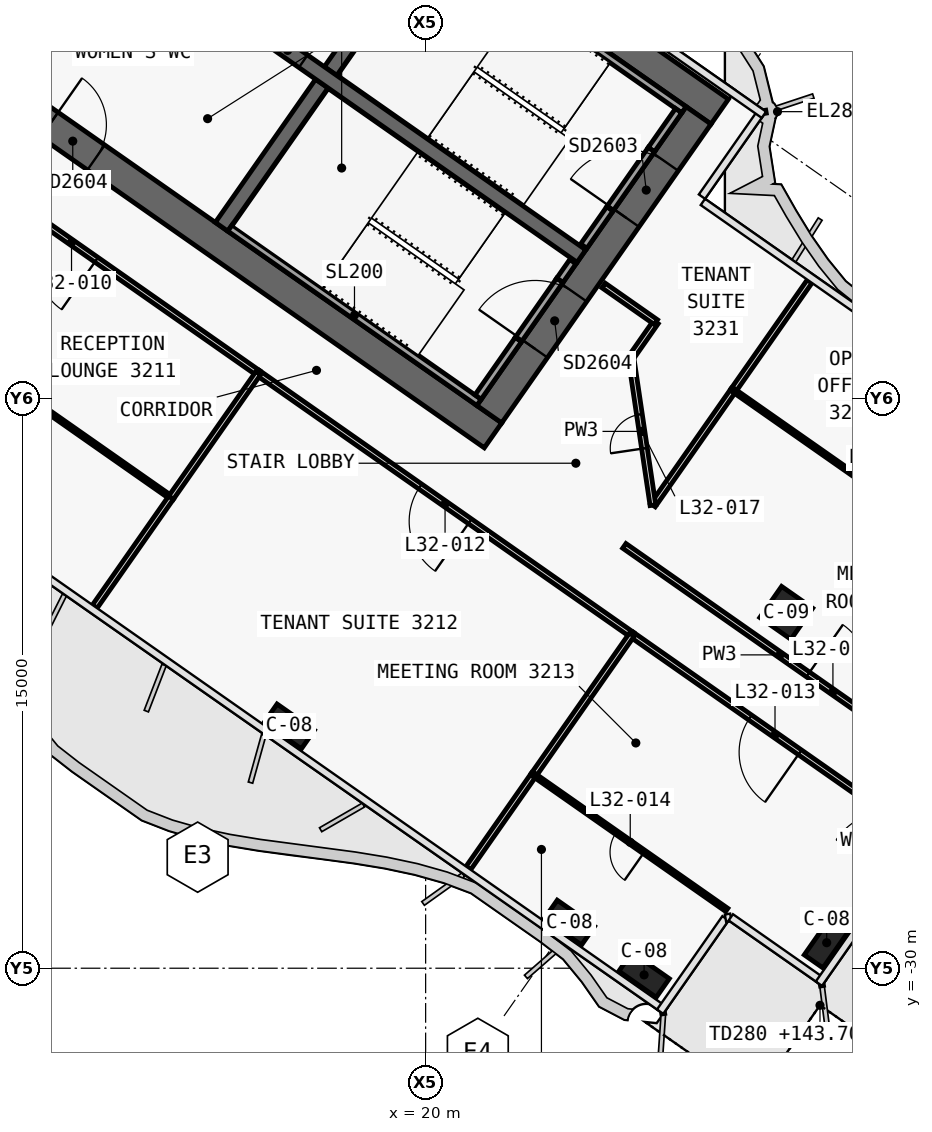
"""IFC4 building model, lengths in metres.
Left out: names, types, materials, properties, quantities, classifications, styles, units other than length and angle.
Written with IfcOpenShell. Run it as: python <this file> out.ifc"""

import sys

from ifc_helpers import new_model, si_unit, direction, frame, frame_2d, origin, origin_2d, place, context, subcontext, project, spatial, polyline, rectangle, outline, extrude, element, fill, save


model = new_model("IFC4")
c1 = context("Model", 3, precision=1e-05, world=origin(), true_north=direction((0.0, 1.0)))
c2 = subcontext(c1, "Body", "Model", "MODEL_VIEW")
j1 = project(units=[si_unit("LENGTHUNIT", "METRE"), si_unit("PLANEANGLEUNIT", "RADIAN")], contexts=[c1])
p1 = place(None, origin())
s1 = spatial("IfcSite", under=j1, at=p1, CompositionType="ELEMENT")
p2 = place(p1, origin())
s2 = spatial("IfcBuilding", under=s1, at=p2, CompositionType="ELEMENT")
p3 = place(p2, frame((0.0, 0.0, 143.7)))
s3 = spatial("IfcBuildingStorey", under=s2, at=p3, CompositionType="ELEMENT", Elevation=143.7)
p4 = place(p3, frame((-0.029, 11.984, 0.0), z_axis=(0.0, 0.0, 1.0), x_axis=(0.819151382952, -0.573577380837, 0.0)))
e1 = element("IfcWall", 1, at=p4, inside=s3, PredefinedType="SHEAR", context=c2, shape_type="SweptSolid", body=[
    extrude(outline(polyline([(33.898, 0.4), (-0.0, 0.4), (0.56, -0.4), (33.898, -0.4), (33.898, 0.4)])), origin(), (0.0, 0.0, 1.0), 3.9),
])
p5 = place(p3, frame((-0.029, -0.712, 0.0), z_axis=(0.0, 0.0, 1.0), x_axis=(0.819151758019, -0.573576845187, 0.0)))
e2 = element("IfcWall", 2, at=p5, inside=s3, PredefinedType="SHEAR", context=c2, shape_type="SweptSolid", body=[
    extrude(outline(polyline([(26.616, 0.4), (-0.0, 0.4), (0.56, -0.4), (26.616, -0.4), (26.616, 0.4)])), origin(), (0.0, 0.0, 1.0), 3.9),
])
p6 = place(p5, frame((6.666, 0.0, 0.0)))
e3 = element("IfcOpeningElement", 3, at=p6, cuts=e2, PredefinedType="OPENING", context=c2, shape_type="SweptSolid", body=[
    extrude(rectangle(XDim=1.5, YDim=2.1, at=frame_2d((0.75, 1.05))), frame((0.0, 0.41, 0.0), z_axis=(0.0, -1.0, 0.0), x_axis=(1.0, 0.0, 0.0)), (0.0, 0.0, 1.0), 0.82),
])
p7 = place(p5, frame((12.366, 0.0, 0.0)))
e4 = element("IfcOpeningElement", 4, at=p7, cuts=e2, PredefinedType="OPENING", context=c2, shape_type="SweptSolid", body=[
    extrude(rectangle(XDim=1.5, YDim=2.1, at=frame_2d((0.75, 1.05))), frame((0.0, 0.41, 0.0), z_axis=(0.0, -1.0, 0.0), x_axis=(1.0, 0.0, 0.0)), (0.0, 0.0, 1.0), 0.82),
])
p8 = place(p3, frame((21.675, -15.421, 0.0), z_axis=(0.0, 0.0, 1.0), x_axis=(0.573581815061, 0.819148278049, 0.0)))
e5 = element("IfcWall", 5, at=p8, inside=s3, PredefinedType="SHEAR", context=c2, shape_type="SweptSolid", body=[
    extrude(outline(polyline([(9.6, 0.4), (0.0, 0.4), (0.0, -0.4), (9.6, -0.4), (9.6, 0.4)])), origin(), (0.0, 0.0, 1.0), 3.9),
])
p9 = place(p8, frame((6.3, 0.0, 0.0)))
e6 = element("IfcOpeningElement", 6, at=p9, cuts=e5, PredefinedType="OPENING", context=c2, shape_type="SweptSolid", body=[
    extrude(rectangle(XDim=1.8, YDim=2.1, at=frame_2d((0.9, 1.05))), frame((0.0, 0.41, 0.0), z_axis=(0.0, -1.0, 0.0), x_axis=(1.0, 0.0, 0.0)), (0.0, 0.0, 1.0), 0.82),
])
p10 = place(p8, frame((2.1, 0.0, 0.0)))
e7 = element("IfcOpeningElement", 7, at=p10, cuts=e5, PredefinedType="OPENING", context=c2, shape_type="SweptSolid", body=[
    extrude(rectangle(XDim=1.8, YDim=2.1, at=frame_2d((0.9, 1.05))), frame((0.0, 0.41, 0.0), z_axis=(0.0, -1.0, 0.0), x_axis=(1.0, 0.0, 0.0)), (0.0, 0.0, 1.0), 0.82),
])
p11 = place(p3, frame((14.63, -10.488, 0.0), z_axis=(0.0, 0.0, 1.0), x_axis=(0.573611936273, 0.819127185829, 0.0)))
e8 = element("IfcWall", 8, at=p11, inside=s3, PredefinedType="SHEAR", context=c2, shape_type="SweptSolid", body=[
    extrude(outline(polyline([(0.0, 0.2), (0.0, -0.2), (4.6, -0.2), (4.6, 0.2), (0.0, 0.2)])), origin(), (0.0, 0.0, 1.0), 3.9),
])
p12 = place(p3, frame((17.498, -6.392, 0.0), z_axis=(0.0, 0.0, 1.0), x_axis=(0.573611936273, 0.819127185829, 0.0)))
e9 = element("IfcWall", 9, at=p12, inside=s3, PredefinedType="SHEAR", context=c2, shape_type="SweptSolid", body=[
    extrude(outline(polyline([(4.6, -0.2), (4.6, 0.2), (0.0, 0.2), (0.0, -0.2), (4.6, -0.2)])), origin(), (0.0, 0.0, 1.0), 3.9),
])
p13 = place(p3, frame((2.638, 3.768, 0.0), z_axis=(0.0, 0.0, 1.0), x_axis=(0.81915267502, -0.573575535572, 0.0)))
e10 = element("IfcWall", 10, at=p13, inside=s3, PredefinedType="SHEAR", context=c2, shape_type="SweptSolid", body=[
    extrude(outline(polyline([(0.0, 0.2), (0.0, -0.2), (26.2, -0.2), (26.2, 0.2), (0.0, 0.2)])), origin(), (0.0, 0.0, 1.0), 3.9),
])
p14 = place(p13, frame((9.637, 0.0, 0.0)))
e11 = element("IfcOpeningElement", 11, at=p14, cuts=e10, PredefinedType="OPENING", context=c2, shape_type="SweptSolid", body=[
    extrude(rectangle(XDim=1.2, YDim=2.1, at=frame_2d((0.6, 1.05))), frame((0.0, 0.21, 0.0), z_axis=(0.0, -1.0, 0.0), x_axis=(1.0, 0.0, 0.0)), (0.0, 0.0, 1.0), 0.42),
])
p15 = place(p13, frame((11.812, 0.0, 0.0)))
e12 = element("IfcOpeningElement", 12, at=p15, cuts=e10, PredefinedType="OPENING", context=c2, shape_type="SweptSolid", body=[
    extrude(rectangle(XDim=1.2, YDim=2.1, at=frame_2d((0.6, 1.05))), frame((0.0, 0.21, 0.0), z_axis=(0.0, -1.0, 0.0), x_axis=(1.0, 0.0, 0.0)), (0.0, 0.0, 1.0), 0.42),
])
p16 = place(p13, frame((13.988, 0.0, 0.0)))
e13 = element("IfcOpeningElement", 13, at=p16, cuts=e10, PredefinedType="OPENING", context=c2, shape_type="SweptSolid", body=[
    extrude(rectangle(XDim=1.2, YDim=2.1, at=frame_2d((0.6, 1.05))), frame((0.0, 0.21, 0.0), z_axis=(0.0, -1.0, 0.0), x_axis=(1.0, 0.0, 0.0)), (0.0, 0.0, 1.0), 0.42),
])
p17 = place(p13, frame((16.262, 0.0, 0.0)))
e14 = element("IfcOpeningElement", 14, at=p17, cuts=e10, PredefinedType="OPENING", context=c2, shape_type="SweptSolid", body=[
    extrude(rectangle(XDim=1.0, YDim=2.1, at=frame_2d((0.5, 1.05))), frame((0.0, 0.21, 0.0), z_axis=(0.0, -1.0, 0.0), x_axis=(1.0, 0.0, 0.0)), (0.0, 0.0, 1.0), 0.42),
])
for number, where, z_axis, x_axis in (
    (15, (16.41, -23.637, 0.0), (0.0, 0.0, 1.0), (0.819, -0.574, 0.0)),
    (16, (23.782, -28.799, 0.0), (0.0, 0.0, 1.0), (0.819, -0.574, 0.0)),
    (17, (25.748, -30.176, 0.0), (0.0, 0.0, 1.0), (0.819, -0.574, 0.0)),
    (18, (30.553, -29.329, 0.0), (0.0, 0.0, 1.0), (0.574, 0.819, 0.0)),
):
    element("IfcColumn", number, at=place(p3, frame(where, z_axis=z_axis, x_axis=x_axis)), inside=s3, PredefinedType="COLUMN", context=c2, shape_type="SweptSolid", body=[
        extrude(rectangle(XDim=1.2, YDim=0.6, at=origin_2d()), origin(), (0.0, 0.0, 1.0), 3.9),
    ])
p18 = place(p3, frame((29.49, -20.649, 0.0), z_axis=(0.0, 0.0, 1.0), x_axis=(0.819152044289, -0.573576436351, 0.0)))
e19 = element("IfcColumn", 19, at=p18, inside=s3, PredefinedType="COLUMN", context=c2, shape_type="SweptSolid", body=[
    extrude(rectangle(XDim=1.0, YDim=1.0, at=origin_2d()), origin(), (0.0, 0.0, 1.0), 3.9),
])
p19 = place(p3, frame((20.243, -2.821, 0.0), z_axis=(0.0, 0.0, 1.0), x_axis=(0.819141584393, -0.57359137434, 0.0)))
e20 = element("IfcWall", 20, at=p19, inside=s3, PredefinedType="SOLIDWALL", context=c2, shape_type="SweptSolid", body=[
    extrude(rectangle(XDim=8.0, YDim=0.2, at=frame_2d((4.0, 0.0))), origin(), (0.0, 0.0, 1.0), 3.62),
])
p20 = place(p3, frame((24.162, -10.998, 0.0), z_axis=(0.0, 0.0, 1.0), x_axis=(0.573612502218, 0.819126789514, 0.0)))
e21 = element("IfcWall", 21, at=p20, inside=s3, PredefinedType="SOLIDWALL", context=c2, shape_type="SweptSolid", body=[
    extrude(rectangle(XDim=1.2, YDim=0.2, at=frame_2d((0.6, 0.0))), origin(), (0.0, 0.0, 1.0), 3.62),
])
p21 = place(p3, frame((25.94, -8.458, 0.0), z_axis=(0.0, 0.0, 1.0), x_axis=(0.573619628835, 0.819121798889, 0.0)))
e22 = element("IfcWall", 22, at=p21, inside=s3, PredefinedType="SOLIDWALL", context=c2, shape_type="SweptSolid", body=[
    extrude(rectangle(XDim=1.25, YDim=0.2, at=frame_2d((0.625, 0.0))), origin(), (0.0, 0.0, 1.0), 3.62),
])
p22 = place(p3, frame((24.85, -10.014, 2.15), z_axis=(0.0, 0.0, 1.0), x_axis=(0.573505465124, 0.819201734296, 0.0)))
e23 = element("IfcWall", 23, at=p22, inside=s3, PredefinedType="SOLIDWALL", context=c2, shape_type="SweptSolid", body=[
    extrude(rectangle(XDim=1.9, YDim=0.2, at=frame_2d((0.95, 0.0))), origin(), (0.0, 0.0, 1.0), 1.47),
])
p23 = place(p3, frame((14.851, -10.521, 0.0), z_axis=(0.0, 0.0, 1.0), x_axis=(0.819141584393, -0.57359137434, 0.0)))
e24 = element("IfcWall", 24, at=p23, inside=s3, PredefinedType="SOLIDWALL", context=c2, shape_type="SweptSolid", body=[
    extrude(rectangle(XDim=8.0, YDim=0.2, at=frame_2d((4.0, 0.0))), origin(), (0.0, 0.0, 1.0), 3.62),
])
p24 = place(p3, frame((21.38, -14.97, 0.0), z_axis=(0.0, 0.0, 1.0), x_axis=(0.573559770908, 0.819163713305, 0.0)))
e25 = element("IfcWall", 25, at=p24, inside=s3, PredefinedType="SOLIDWALL", context=c2, shape_type="SweptSolid", body=[
    extrude(rectangle(XDim=1.85, YDim=0.2, at=frame_2d((0.925, 0.0))), origin(), (0.0, 0.0, 1.0), 3.62),
])
p25 = place(p3, frame((23.531, -11.898, 0.0), z_axis=(0.0, 0.0, 1.0), x_axis=(0.573708088123, 0.819059844958, 0.0)))
e26 = element("IfcWall", 26, at=p25, inside=s3, PredefinedType="SOLIDWALL", context=c2, shape_type="SweptSolid", body=[
    extrude(rectangle(XDim=0.6, YDim=0.2, at=frame_2d((0.3, 0.0))), origin(), (0.0, 0.0, 1.0), 3.62),
])
p26 = place(p3, frame((22.441, -13.455, 2.15), z_axis=(0.0, 0.0, 1.0), x_axis=(0.573591692345, 0.819141361715, 0.0)))
e27 = element("IfcWall", 27, at=p26, inside=s3, PredefinedType="SOLIDWALL", context=c2, shape_type="SweptSolid", body=[
    extrude(rectangle(XDim=1.9, YDim=0.2, at=frame_2d((0.95, 0.0))), origin(), (0.0, 0.0, 1.0), 1.47),
])
p27 = place(p3, frame((25.228, -18.886, 0.0), z_axis=(0.0, 0.0, 1.0), x_axis=(0.819155080891, -0.573572099609, 0.0)))
e28 = element("IfcWall", 28, at=p27, inside=s3, PredefinedType="PARTITIONING", context=c2, shape_type="SweptSolid", body=[
    extrude(rectangle(XDim=10.002, YDim=0.15, at=frame_2d((5.001, 0.0))), origin(), (0.0, 0.0, 1.0), 3.0),
])
p28 = place(p27, frame((5.901, 0.0, 0.0)))
e29 = element("IfcOpeningElement", 29, at=p28, cuts=e28, PredefinedType="OPENING", context=c2, shape_type="SweptSolid", body=[
    extrude(rectangle(XDim=1.6, YDim=2.1, at=frame_2d((0.8, 1.05))), frame((0.0, 0.085, 0.0), z_axis=(0.0, -1.0, 0.0), x_axis=(1.0, 0.0, 0.0)), (0.0, 0.0, 1.0), 0.17),
])
p29 = place(p3, frame((15.598, -14.34, 0.0), z_axis=(0.0, 0.0, 1.0), x_axis=(-0.81915546166, 0.573571555809, 0.0)))
e30 = element("IfcWall", 30, at=p29, inside=s3, PredefinedType="PARTITIONING", context=c2, shape_type="SweptSolid", body=[
    extrude(rectangle(XDim=12.002, YDim=0.15, at=frame_2d((6.001, 0.0))), origin(), (0.0, 0.0, 1.0), 3.0),
])
p30 = place(p29, frame((5.201, 0.0, 0.0)))
e31 = element("IfcOpeningElement", 31, at=p30, cuts=e30, PredefinedType="OPENING", context=c2, shape_type="SweptSolid", body=[
    extrude(rectangle(XDim=1.6, YDim=2.1, at=frame_2d((0.8, 1.05))), frame((0.0, 0.085, 0.0), z_axis=(0.0, -1.0, 0.0), x_axis=(1.0, 0.0, 0.0)), (0.0, 0.0, 1.0), 0.17),
])
p31 = place(p3, frame((25.427, -21.223, 0.0), z_axis=(0.0, 0.0, 1.0), x_axis=(-0.819147828287, 0.573582457378, 0.0)))
e32 = element("IfcWall", 32, at=p31, inside=s3, PredefinedType="PARTITIONING", context=c2, shape_type="SweptSolid", body=[
    extrude(rectangle(XDim=12.004, YDim=0.15, at=frame_2d((6.002, 0.0))), origin(), (0.0, 0.0, 1.0), 3.0),
])
p32 = place(p31, frame((5.202, 0.0, 0.0)))
e33 = element("IfcOpeningElement", 33, at=p32, cuts=e32, PredefinedType="OPENING", context=c2, shape_type="SweptSolid", body=[
    extrude(rectangle(XDim=1.6, YDim=2.1, at=frame_2d((0.8, 1.05))), frame((0.0, 0.085, 0.0), z_axis=(0.0, -1.0, 0.0), x_axis=(1.0, 0.0, 0.0)), (0.0, 0.0, 1.0), 0.17),
])
p33 = place(p3, frame((32.962, -26.499, 0.0), z_axis=(0.0, 0.0, 1.0), x_axis=(-0.81915089424, 0.573578078788, 0.0)))
e34 = element("IfcWall", 34, at=p33, inside=s3, PredefinedType="PARTITIONING", context=c2, shape_type="SweptSolid", body=[
    extrude(rectangle(XDim=9.202, YDim=0.15, at=frame_2d((4.601, 0.0))), origin(), (0.0, 0.0, 1.0), 2.9),
])
p34 = place(p33, frame((3.801, 0.0, 0.0)))
e35 = element("IfcOpeningElement", 35, at=p34, cuts=e34, PredefinedType="OPENING", context=c2, shape_type="SweptSolid", body=[
    extrude(rectangle(XDim=1.6, YDim=2.1, at=frame_2d((0.8, 1.05))), frame((0.0, 0.085, 0.0), z_axis=(0.0, -1.0, 0.0), x_axis=(1.0, 0.0, 0.0)), (0.0, 0.0, 1.0), 0.17),
])
p35 = place(p3, frame((30.105, -11.924, 0.0), z_axis=(0.0, 0.0, 1.0), x_axis=(-0.573560622794, -0.819163116834, 0.0)))
e36 = element("IfcWall", 36, at=p35, inside=s3, PredefinedType="PARTITIONING", context=c2, shape_type="SweptSolid", body=[
    extrude(rectangle(XDim=3.501, YDim=0.15, at=frame_2d((1.75, 0.0))), origin(), (0.0, 0.0, 1.0), 3.0),
])
p36 = place(p3, frame((28.099, -14.789, 0.0), z_axis=(0.0, 0.0, 1.0), x_axis=(-0.573577686589, -0.819151168862, 0.0)))
e37 = element("IfcWall", 37, at=p36, inside=s3, PredefinedType="PARTITIONING", context=c2, shape_type="SweptSolid", body=[
    extrude(rectangle(XDim=3.693, YDim=0.15, at=frame_2d((1.847, 0.0))), origin(), (0.0, 0.0, 1.0), 3.62),
])
p37 = place(p3, frame((25.98, -17.815, 0.0), z_axis=(0.0, 0.0, 1.0), x_axis=(-0.146956602865, 0.989142940567, 0.0)))
e38 = element("IfcWall", 38, at=p37, inside=s3, PredefinedType="PARTITIONING", context=c2, shape_type="SweptSolid", body=[
    extrude(rectangle(XDim=3.926, YDim=0.15, at=frame_2d((1.963, 0.0))), origin(), (0.0, 0.0, 1.0), 3.62),
])
p38 = place(p37, frame((1.513, 0.0, 0.0)))
e39 = element("IfcOpeningElement", 39, at=p38, cuts=e38, PredefinedType="OPENING", context=c2, shape_type="SweptSolid", body=[
    extrude(rectangle(XDim=0.9, YDim=2.1, at=frame_2d((0.45, 1.05))), frame((0.0, 0.085, 0.0), z_axis=(0.0, -1.0, 0.0), x_axis=(1.0, 0.0, 0.0)), (0.0, 0.0, 1.0), 0.17),
])
p39 = place(p3, frame((25.403, -13.932, 0.0), z_axis=(0.0, 0.0, 1.0), x_axis=(0.573462344363, 0.819231920519, 0.0)))
e40 = element("IfcWall", 40, at=p39, inside=s3, PredefinedType="PARTITIONING", context=c2, shape_type="SweptSolid", body=[
    extrude(rectangle(XDim=1.141, YDim=0.15, at=frame_2d((0.571, 0.0))), origin(), (0.0, 0.0, 1.0), 3.62),
])
p40 = place(p3, frame((26.058, -12.997, 0.0), z_axis=(0.0, 0.0, 1.0), x_axis=(-0.819109000826, 0.573637903879, 0.0)))
e41 = element("IfcWall", 41, at=p40, inside=s3, PredefinedType="PARTITIONING", context=c2, shape_type="SweptSolid", body=[
    extrude(rectangle(XDim=1.68, YDim=0.15, at=frame_2d((0.84, 0.0))), origin(), (0.0, 0.0, 1.0), 3.62),
])
p41 = place(p3, frame((28.098, -14.79, 0.0), z_axis=(0.0, 0.0, 1.0), x_axis=(0.819153008203, -0.573575059736, 0.0)))
e42 = element("IfcWall", 42, at=p41, inside=s3, PredefinedType="PARTITIONING", context=c2, shape_type="SweptSolid", body=[
    extrude(rectangle(XDim=10.03, YDim=0.1, at=frame_2d((5.015, 0.0))), origin(), (0.0, 0.0, 1.0), 2.9),
])
p42 = place(p41, frame((4.565, 0.0, 0.0)))
e43 = element("IfcOpeningElement", 43, at=p42, cuts=e42, PredefinedType="OPENING", context=c2, shape_type="SweptSolid", body=[
    extrude(rectangle(XDim=0.9, YDim=2.1, at=frame_2d((0.45, 1.05))), frame((0.0, 0.06, 0.0), z_axis=(0.0, -1.0, 0.0), x_axis=(1.0, 0.0, 0.0)), (0.0, 0.0, 1.0), 0.12),
])
p43 = place(p3, frame((13.301, -17.616, 0.0), z_axis=(0.0, 0.0, 1.0), x_axis=(-0.819146845232, 0.573583861302, 0.0)))
e44 = element("IfcWall", 44, at=p43, inside=s3, PredefinedType="PARTITIONING", context=c2, shape_type="SweptSolid", body=[
    extrude(rectangle(XDim=12.0, YDim=0.1, at=frame_2d((6.0, 0.0))), origin(), (0.0, 0.0, 1.0), 3.0),
])
p44 = place(p43, frame((5.55, 0.0, 0.0)))
e45 = element("IfcOpeningElement", 45, at=p44, cuts=e44, PredefinedType="OPENING", context=c2, shape_type="SweptSolid", body=[
    extrude(rectangle(XDim=0.9, YDim=2.1, at=frame_2d((0.45, 1.05))), frame((0.0, 0.06, 0.0), z_axis=(0.0, -1.0, 0.0), x_axis=(1.0, 0.0, 0.0)), (0.0, 0.0, 1.0), 0.12),
])
p45 = place(p3, frame((13.301, -17.616, 0.0), z_axis=(0.0, 0.0, 1.0), x_axis=(-0.573555999232, -0.819166354134, 0.0)))
e46 = element("IfcWall", 46, at=p45, inside=s3, PredefinedType="PARTITIONING", context=c2, shape_type="SweptSolid", body=[
    extrude(rectangle(XDim=3.499, YDim=0.15, at=frame_2d((1.75, 0.0))), origin(), (0.0, 0.0, 1.0), 2.9),
])
p46 = place(p3, frame((15.596, -14.339, 0.0), z_axis=(0.0, 0.0, 1.0), x_axis=(-0.573556557423, -0.819165963305, 0.0)))
e47 = element("IfcWall", 47, at=p46, inside=s3, PredefinedType="PARTITIONING", context=c2, shape_type="SweptSolid", body=[
    extrude(rectangle(XDim=4.0, YDim=0.15, at=frame_2d((2.0, 0.0))), origin(), (0.0, 0.0, 1.0), 3.62),
])
p47 = place(p3, frame((22.845, -24.907, 0.0), z_axis=(0.0, 0.0, 1.0), x_axis=(-0.573555162214, -0.819166940189, 0.0)))
e48 = element("IfcWall", 48, at=p47, inside=s3, PredefinedType="PARTITIONING", context=c2, shape_type="SweptSolid", body=[
    extrude(rectangle(XDim=3.001, YDim=0.15, at=frame_2d((1.5, 0.0))), origin(), (0.0, 0.0, 1.0), 2.9),
])
p48 = place(p3, frame((25.426, -21.222, 0.0), z_axis=(0.0, 0.0, 1.0), x_axis=(-0.573589723117, -0.819142740634, 0.0)))
e49 = element("IfcWall", 49, at=p48, inside=s3, PredefinedType="PARTITIONING", context=c2, shape_type="SweptSolid", body=[
    extrude(rectangle(XDim=4.502, YDim=0.15, at=frame_2d((2.251, 0.0))), origin(), (0.0, 0.0, 1.0), 3.62),
])
p49 = place(p3, frame((27.923, -28.465, 0.0), z_axis=(0.0, 0.0, 1.0), x_axis=(-0.819159766912, 0.573565407145, 0.0)))
e50 = element("IfcWall", 50, at=p49, inside=s3, PredefinedType="PARTITIONING", context=c2, shape_type="SweptSolid", body=[
    extrude(rectangle(XDim=6.2, YDim=0.1, at=frame_2d((3.1, 0.0))), origin(), (0.0, 0.0, 1.0), 3.0),
])
p50 = place(p49, frame((2.65, 0.0, 0.0)))
e51 = element("IfcOpeningElement", 51, at=p50, cuts=e50, PredefinedType="OPENING", context=c2, shape_type="SweptSolid", body=[
    extrude(rectangle(XDim=0.9, YDim=2.1, at=frame_2d((0.45, 1.05))), frame((0.0, 0.06, 0.0), z_axis=(0.0, -1.0, 0.0), x_axis=(1.0, 0.0, 0.0)), (0.0, 0.0, 1.0), 0.12),
])
p51 = place(p17, origin())
e52 = element("IfcDoor", 52, at=p51, inside=s3, OperationType="SINGLE_SWING_RIGHT", PredefinedType="DOOR", context=c2, shape_type="SweptSolid", body=[
    extrude(rectangle(XDim=1.0, YDim=2.1, at=frame_2d((0.5, 1.05))), frame((0.0, 0.025, 0.0), z_axis=(0.0, -1.0, 0.0), x_axis=(1.0, 0.0, 0.0)), (0.0, 0.0, 1.0), 0.05),
])
fill(e14, e52)
p52 = place(p7, origin())
e53 = element("IfcDoor", 53, at=p52, inside=s3, OperationType="DOUBLE_DOOR_SINGLE_SWING", PredefinedType="DOOR", context=c2, shape_type="SweptSolid", body=[
    extrude(rectangle(XDim=1.5, YDim=2.1, at=frame_2d((0.75, 1.05))), frame((0.0, 0.025, 0.0), z_axis=(0.0, -1.0, 0.0), x_axis=(1.0, 0.0, 0.0)), (0.0, 0.0, 1.0), 0.05),
])
fill(e4, e53)
p53 = place(p9, origin())
e54 = element("IfcDoor", 54, at=p53, inside=s3, OperationType="DOUBLE_DOOR_SINGLE_SWING", PredefinedType="DOOR", context=c2, shape_type="SweptSolid", body=[
    extrude(rectangle(XDim=1.8, YDim=2.1, at=frame_2d((0.9, 1.05))), frame((0.0, 0.025, 0.0), z_axis=(0.0, -1.0, 0.0), x_axis=(1.0, 0.0, 0.0)), (0.0, 0.0, 1.0), 0.05),
])
fill(e6, e54)
p54 = place(p10, origin())
e55 = element("IfcDoor", 55, at=p54, inside=s3, OperationType="DOUBLE_DOOR_SINGLE_SWING", PredefinedType="DOOR", context=c2, shape_type="SweptSolid", body=[
    extrude(rectangle(XDim=1.8, YDim=2.1, at=frame_2d((0.9, 1.05))), frame((0.0, 0.025, 0.0), z_axis=(0.0, -1.0, 0.0), x_axis=(1.0, 0.0, 0.0)), (0.0, 0.0, 1.0), 0.05),
])
fill(e7, e55)
p55 = place(p30, origin())
e56 = element("IfcDoor", 56, at=p55, inside=s3, OperationType="DOUBLE_DOOR_SINGLE_SWING", PredefinedType="DOOR", context=c2, shape_type="SweptSolid", body=[
    extrude(rectangle(XDim=1.6, YDim=2.1, at=frame_2d((0.8, 1.05))), frame((0.0, 0.025, 0.0), z_axis=(0.0, -1.0, 0.0), x_axis=(1.0, 0.0, 0.0)), (0.0, 0.0, 1.0), 0.05),
])
fill(e31, e56)
p56 = place(p32, origin())
e57 = element("IfcDoor", 57, at=p56, inside=s3, OperationType="DOUBLE_DOOR_SINGLE_SWING", PredefinedType="DOOR", context=c2, shape_type="SweptSolid", body=[
    extrude(rectangle(XDim=1.6, YDim=2.1, at=frame_2d((0.8, 1.05))), frame((0.0, 0.025, 0.0), z_axis=(0.0, -1.0, 0.0), x_axis=(1.0, 0.0, 0.0)), (0.0, 0.0, 1.0), 0.05),
])
fill(e33, e57)
p57 = place(p34, origin())
e58 = element("IfcDoor", 58, at=p57, inside=s3, OperationType="DOUBLE_DOOR_SINGLE_SWING", PredefinedType="DOOR", context=c2, shape_type="SweptSolid", body=[
    extrude(rectangle(XDim=1.6, YDim=2.1, at=frame_2d((0.8, 1.05))), frame((0.0, 0.025, 0.0), z_axis=(0.0, -1.0, 0.0), x_axis=(1.0, 0.0, 0.0)), (0.0, 0.0, 1.0), 0.05),
])
fill(e35, e58)
p58 = place(p50, origin())
e59 = element("IfcDoor", 59, at=p58, inside=s3, OperationType="SINGLE_SWING_LEFT", PredefinedType="DOOR", context=c2, shape_type="SweptSolid", body=[
    extrude(rectangle(XDim=0.9, YDim=2.1, at=frame_2d((0.45, 1.05))), frame((0.0, 0.025, 0.0), z_axis=(0.0, -1.0, 0.0), x_axis=(1.0, 0.0, 0.0)), (0.0, 0.0, 1.0), 0.05),
])
fill(e51, e59)
p59 = place(p28, origin())
e60 = element("IfcDoor", 60, at=p59, inside=s3, OperationType="DOUBLE_DOOR_SINGLE_SWING", PredefinedType="DOOR", context=c2, shape_type="SweptSolid", body=[
    extrude(rectangle(XDim=1.6, YDim=2.1, at=frame_2d((0.8, 1.05))), frame((0.0, 0.025, 0.0), z_axis=(0.0, -1.0, 0.0), x_axis=(1.0, 0.0, 0.0)), (0.0, 0.0, 1.0), 0.05),
])
fill(e29, e60)
p60 = place(p38, origin())
e61 = element("IfcDoor", 61, at=p60, inside=s3, OperationType="SINGLE_SWING_LEFT", PredefinedType="DOOR", context=c2, shape_type="SweptSolid", body=[
    extrude(rectangle(XDim=0.9, YDim=2.1, at=frame_2d((0.45, 1.05))), frame((0.0, 0.025, 0.0), z_axis=(0.0, -1.0, 0.0), x_axis=(1.0, 0.0, 0.0)), (0.0, 0.0, 1.0), 0.05),
])
fill(e39, e61)
save(model, sys.argv[1])
